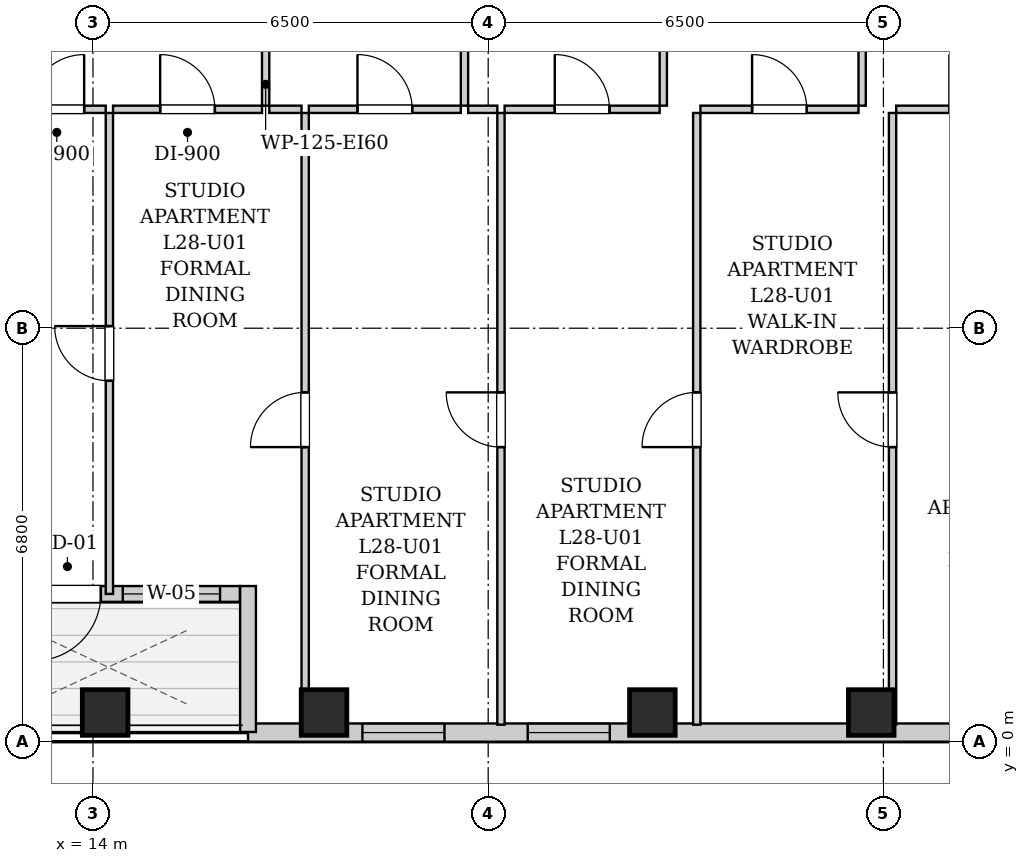
"""IFC4 building model, lengths in metres.
Left out: names, types, materials, properties, quantities, classifications, styles, units other than length and angle.
Written with IfcOpenShell. Run it as: python <this file> out.ifc"""

import sys

from ifc_helpers import new_model, si_unit, direction, frame, frame_2d, origin, origin_2d, place, context, subcontext, project, spatial, rectangle, extrude, element, fill, save


model = new_model("IFC4")
c1 = context("Model", 3, precision=1e-05, world=origin(), true_north=direction((0.0, 1.0)))
c2 = subcontext(c1, "Body", "Model", "MODEL_VIEW")
j1 = project(units=[si_unit("LENGTHUNIT", "METRE"), si_unit("PLANEANGLEUNIT", "RADIAN")], contexts=[c1])
p1 = place(None, origin())
s1 = spatial("IfcSite", under=j1, at=p1, CompositionType="ELEMENT")
p2 = place(p1, origin())
s2 = spatial("IfcBuilding", under=s1, at=p2, CompositionType="ELEMENT")
p3 = place(p2, frame((0.0, 0.0, 100.7)))
s3 = spatial("IfcBuildingStorey", under=s2, at=p3, CompositionType="ELEMENT", Elevation=100.7)
for number, where, z_axis, x_axis in (
    (1, (14.2, 0.48, 0.0), (0.0, 0.0, 1.0), (1.0, 0.0, 0.0)),
    (2, (17.8, 0.48, 0.0), (0.0, 0.0, 1.0), (1.0, 0.0, 0.0)),
    (3, (23.2, 0.48, 0.0), (0.0, 0.0, 1.0), (1.0, 0.0, 0.0)),
    (4, (26.8, 0.48, 0.0), (0.0, 0.0, 1.0), (1.0, 0.0, 0.0)),
):
    element("IfcColumn", number, at=place(p3, frame(where, z_axis=z_axis, x_axis=x_axis)), inside=s3, PredefinedType="COLUMN", context=c2, shape_type="SweptSolid", body=[
        extrude(rectangle(XDim=0.75, YDim=0.75, at=origin_2d()), origin(), (0.0, 0.0, 1.0), 3.2),
    ])
p4 = place(p3, frame((40.9, 0.15, 0.0), z_axis=(0.0, 0.0, 1.0), x_axis=(-1.0, 0.0, 0.0)))
e5 = element("IfcWall", 5, at=p4, inside=s3, PredefinedType="SOLIDWALL", context=c2, shape_type="SweptSolid", body=[
    extrude(rectangle(XDim=24.35, YDim=0.3, at=frame_2d((12.175, 0.0))), origin(), (0.0, 0.0, 1.0), 2.94),
])
p5 = place(p4, frame((21.119, 0.0, 0.55)))
e6 = element("IfcOpeningElement", 6, at=p5, cuts=e5, PredefinedType="OPENING", context=c2, shape_type="SweptSolid", body=[
    extrude(rectangle(XDim=1.35, YDim=1.2, at=frame_2d((0.675, 0.6))), frame((0.0, 0.16, 0.0), z_axis=(0.0, -1.0, 0.0), x_axis=(1.0, 0.0, 0.0)), (0.0, 0.0, 1.0), 0.32),
])
p6 = place(p4, frame((18.4, 0.0, 0.55)))
e7 = element("IfcOpeningElement", 7, at=p6, cuts=e5, PredefinedType="OPENING", context=c2, shape_type="SweptSolid", body=[
    extrude(rectangle(XDim=1.35, YDim=1.2, at=frame_2d((0.675, 0.6))), frame((0.0, 0.16, 0.0), z_axis=(0.0, -1.0, 0.0), x_axis=(1.0, 0.0, 0.0)), (0.0, 0.0, 1.0), 0.32),
])
p7 = place(p4, frame((11.424, 0.0, 0.55)))
e8 = element("IfcOpeningElement", 8, at=p7, cuts=e5, PredefinedType="OPENING", context=c2, shape_type="SweptSolid", body=[
    extrude(rectangle(XDim=1.35, YDim=1.2, at=frame_2d((0.675, 0.6))), frame((0.0, 0.16, 0.0), z_axis=(0.0, -1.0, 0.0), x_axis=(1.0, 0.0, 0.0)), (0.0, 0.0, 1.0), 0.32),
])
p8 = place(p4, frame((8.268, 0.0, 0.55)))
e9 = element("IfcOpeningElement", 9, at=p8, cuts=e5, PredefinedType="OPENING", context=c2, shape_type="SweptSolid", body=[
    extrude(rectangle(XDim=1.35, YDim=1.2, at=frame_2d((0.675, 0.6))), frame((0.0, 0.16, 0.0), z_axis=(0.0, -1.0, 0.0), x_axis=(1.0, 0.0, 0.0)), (0.0, 0.0, 1.0), 0.32),
])
p9 = place(p4, frame((5.037, 0.0, 0.55)))
e10 = element("IfcOpeningElement", 10, at=p9, cuts=e5, PredefinedType="OPENING", context=c2, shape_type="SweptSolid", body=[
    extrude(rectangle(XDim=1.35, YDim=1.2, at=frame_2d((0.675, 0.6))), frame((0.0, 0.16, 0.0), z_axis=(0.0, -1.0, 0.0), x_axis=(1.0, 0.0, 0.0)), (0.0, 0.0, 1.0), 0.32),
])
p10 = place(p3, frame((16.55, 0.16, 0.0), z_axis=(0.0, 0.0, 1.0), x_axis=(0.0, 1.0, 0.0)))
e11 = element("IfcWall", 11, at=p10, inside=s3, PredefinedType="SOLIDWALL", context=c2, shape_type="SweptSolid", body=[
    extrude(rectangle(XDim=2.4, YDim=0.26, at=frame_2d((1.2, 0.0))), origin(), (0.0, 0.0, 1.0), 2.94),
])
p11 = place(p3, frame((16.416, 2.43, 0.0), z_axis=(0.0, 0.0, 1.0), x_axis=(-1.0, 0.0, 0.0)))
e12 = element("IfcWall", 12, at=p11, inside=s3, PredefinedType="SOLIDWALL", context=c2, shape_type="SweptSolid", body=[
    extrude(rectangle(XDim=4.332, YDim=0.26, at=frame_2d((2.166, 0.0))), origin(), (0.0, 0.0, 1.0), 2.94),
])
p12 = place(p11, frame((2.286, 0.0, 0.0)))
e13 = element("IfcOpeningElement", 13, at=p12, cuts=e12, PredefinedType="OPENING", context=c2, shape_type="SweptSolid", body=[
    extrude(rectangle(XDim=1.1, YDim=2.0, at=frame_2d((0.55, 1.0))), frame((0.0, 0.14, 0.0), z_axis=(0.0, -1.0, 0.0), x_axis=(1.0, 0.0, 0.0)), (0.0, 0.0, 1.0), 0.28),
])
p13 = place(p11, frame((0.326, 0.0, 0.85)))
e14 = element("IfcOpeningElement", 14, at=p13, cuts=e12, PredefinedType="OPENING", context=c2, shape_type="SweptSolid", body=[
    extrude(rectangle(XDim=1.6, YDim=1.65, at=frame_2d((0.8, 0.825))), frame((0.0, 0.14, 0.0), z_axis=(0.0, -1.0, 0.0), x_axis=(1.0, 0.0, 0.0)), (0.0, 0.0, 1.0), 0.28),
])
p14 = place(p3, frame((16.84, 10.46, 0.0), z_axis=(0.0, 0.0, 1.0), x_axis=(0.0, 1.0, 0.0)))
e15 = element("IfcWall", 15, at=p14, inside=s3, PredefinedType="PARTITIONING", context=c2, shape_type="SweptSolid", body=[
    extrude(rectangle(XDim=2.85, YDim=0.12, at=frame_2d((1.425, 0.0))), origin(), (0.0, 0.0, 1.0), 2.94),
])
p15 = place(p14, frame((0.975, 0.0, 0.0)))
e16 = element("IfcOpeningElement", 16, at=p15, cuts=e15, PredefinedType="OPENING", context=c2, shape_type="SweptSolid", body=[
    extrude(rectangle(XDim=0.9, YDim=2.05, at=frame_2d((0.45, 1.025))), frame((0.0, 0.07, 0.0), z_axis=(0.0, -1.0, 0.0), x_axis=(1.0, 0.0, 0.0)), (0.0, 0.0, 1.0), 0.14),
])
p16 = place(p3, frame((12.6, 10.4, 0.0), z_axis=(0.0, 0.0, 1.0), x_axis=(1.0, 0.0, 0.0)))
e17 = element("IfcWall", 17, at=p16, inside=s3, PredefinedType="PARTITIONING", context=c2, shape_type="SweptSolid", body=[
    extrude(rectangle(XDim=1.61, YDim=0.12, at=frame_2d((0.805, 0.0))), origin(), (0.0, 0.0, 1.0), 2.94),
])
p17 = place(p16, frame((0.355, 0.0, 0.0)))
e18 = element("IfcOpeningElement", 18, at=p17, cuts=e17, PredefinedType="OPENING", context=c2, shape_type="SweptSolid", body=[
    extrude(rectangle(XDim=0.9, YDim=2.05, at=frame_2d((0.45, 1.025))), frame((0.0, 0.07, 0.0), z_axis=(0.0, -1.0, 0.0), x_axis=(1.0, 0.0, 0.0)), (0.0, 0.0, 1.0), 0.14),
])
p18 = place(p3, frame((14.33, 10.4, 0.0), z_axis=(0.0, 0.0, 1.0), x_axis=(1.0, 0.0, 0.0)))
e19 = element("IfcWall", 19, at=p18, inside=s3, PredefinedType="PARTITIONING", context=c2, shape_type="SweptSolid", body=[
    extrude(rectangle(XDim=2.45, YDim=0.12, at=frame_2d((1.225, 0.0))), origin(), (0.0, 0.0, 1.0), 2.94),
])
p19 = place(p18, frame((0.775, 0.0, 0.0)))
e20 = element("IfcOpeningElement", 20, at=p19, cuts=e19, PredefinedType="OPENING", context=c2, shape_type="SweptSolid", body=[
    extrude(rectangle(XDim=0.9, YDim=2.05, at=frame_2d((0.45, 1.025))), frame((0.0, 0.07, 0.0), z_axis=(0.0, -1.0, 0.0), x_axis=(1.0, 0.0, 0.0)), (0.0, 0.0, 1.0), 0.14),
])
p20 = place(p3, frame((20.11, 10.46, 0.0), z_axis=(0.0, 0.0, 1.0), x_axis=(0.0, 1.0, 0.0)))
e21 = element("IfcWall", 21, at=p20, inside=s3, PredefinedType="PARTITIONING", context=c2, shape_type="SweptSolid", body=[
    extrude(rectangle(XDim=2.85, YDim=0.12, at=frame_2d((1.425, 0.0))), origin(), (0.0, 0.0, 1.0), 2.94),
])
p21 = place(p20, frame((0.975, 0.0, 0.0)))
e22 = element("IfcOpeningElement", 22, at=p21, cuts=e21, PredefinedType="OPENING", context=c2, shape_type="SweptSolid", body=[
    extrude(rectangle(XDim=0.9, YDim=2.05, at=frame_2d((0.45, 1.025))), frame((0.0, 0.07, 0.0), z_axis=(0.0, -1.0, 0.0), x_axis=(1.0, 0.0, 0.0)), (0.0, 0.0, 1.0), 0.14),
])
p22 = place(p3, frame((16.9, 10.4, 0.0), z_axis=(0.0, 0.0, 1.0), x_axis=(1.0, 0.0, 0.0)))
e23 = element("IfcWall", 23, at=p22, inside=s3, PredefinedType="PARTITIONING", context=c2, shape_type="SweptSolid", body=[
    extrude(rectangle(XDim=0.53, YDim=0.12, at=frame_2d((0.265, 0.0))), origin(), (0.0, 0.0, 1.0), 2.94),
])
p23 = place(p3, frame((17.55, 10.4, 0.0), z_axis=(0.0, 0.0, 1.0), x_axis=(1.0, 0.0, 0.0)))
e24 = element("IfcWall", 24, at=p23, inside=s3, PredefinedType="PARTITIONING", context=c2, shape_type="SweptSolid", body=[
    extrude(rectangle(XDim=2.5, YDim=0.12, at=frame_2d((1.25, 0.0))), origin(), (0.0, 0.0, 1.0), 2.94),
])
p24 = place(p23, frame((0.8, 0.0, 0.0)))
e25 = element("IfcOpeningElement", 25, at=p24, cuts=e24, PredefinedType="OPENING", context=c2, shape_type="SweptSolid", body=[
    extrude(rectangle(XDim=0.9, YDim=2.05, at=frame_2d((0.45, 1.025))), frame((0.0, 0.07, 0.0), z_axis=(0.0, -1.0, 0.0), x_axis=(1.0, 0.0, 0.0)), (0.0, 0.0, 1.0), 0.14),
])
p25 = place(p3, frame((23.38, 10.46, 0.0), z_axis=(0.0, 0.0, 1.0), x_axis=(0.0, 1.0, 0.0)))
e26 = element("IfcWall", 26, at=p25, inside=s3, PredefinedType="PARTITIONING", context=c2, shape_type="SweptSolid", body=[
    extrude(rectangle(XDim=2.85, YDim=0.12, at=frame_2d((1.425, 0.0))), origin(), (0.0, 0.0, 1.0), 2.94),
])
p26 = place(p25, frame((0.975, 0.0, 0.0)))
e27 = element("IfcOpeningElement", 27, at=p26, cuts=e26, PredefinedType="OPENING", context=c2, shape_type="SweptSolid", body=[
    extrude(rectangle(XDim=0.9, YDim=2.05, at=frame_2d((0.45, 1.025))), frame((0.0, 0.07, 0.0), z_axis=(0.0, -1.0, 0.0), x_axis=(1.0, 0.0, 0.0)), (0.0, 0.0, 1.0), 0.14),
])
p27 = place(p3, frame((20.17, 10.4, 0.0), z_axis=(0.0, 0.0, 1.0), x_axis=(1.0, 0.0, 0.0)))
e28 = element("IfcWall", 28, at=p27, inside=s3, PredefinedType="PARTITIONING", context=c2, shape_type="SweptSolid", body=[
    extrude(rectangle(XDim=0.48, YDim=0.12, at=frame_2d((0.24, 0.0))), origin(), (0.0, 0.0, 1.0), 2.94),
])
p28 = place(p3, frame((20.77, 10.4, 0.0), z_axis=(0.0, 0.0, 1.0), x_axis=(1.0, 0.0, 0.0)))
e29 = element("IfcWall", 29, at=p28, inside=s3, PredefinedType="PARTITIONING", context=c2, shape_type="SweptSolid", body=[
    extrude(rectangle(XDim=2.55, YDim=0.12, at=frame_2d((1.275, 0.0))), origin(), (0.0, 0.0, 1.0), 2.94),
])
p29 = place(p28, frame((0.825, 0.0, 0.0)))
e30 = element("IfcOpeningElement", 30, at=p29, cuts=e29, PredefinedType="OPENING", context=c2, shape_type="SweptSolid", body=[
    extrude(rectangle(XDim=0.9, YDim=2.05, at=frame_2d((0.45, 1.025))), frame((0.0, 0.07, 0.0), z_axis=(0.0, -1.0, 0.0), x_axis=(1.0, 0.0, 0.0)), (0.0, 0.0, 1.0), 0.14),
])
p30 = place(p3, frame((26.65, 10.46, 0.0), z_axis=(0.0, 0.0, 1.0), x_axis=(0.0, 1.0, 0.0)))
e31 = element("IfcWall", 31, at=p30, inside=s3, PredefinedType="PARTITIONING", context=c2, shape_type="SweptSolid", body=[
    extrude(rectangle(XDim=2.85, YDim=0.12, at=frame_2d((1.425, 0.0))), origin(), (0.0, 0.0, 1.0), 2.94),
])
p31 = place(p30, frame((0.975, 0.0, 0.0)))
e32 = element("IfcOpeningElement", 32, at=p31, cuts=e31, PredefinedType="OPENING", context=c2, shape_type="SweptSolid", body=[
    extrude(rectangle(XDim=0.9, YDim=2.05, at=frame_2d((0.45, 1.025))), frame((0.0, 0.07, 0.0), z_axis=(0.0, -1.0, 0.0), x_axis=(1.0, 0.0, 0.0)), (0.0, 0.0, 1.0), 0.14),
])
p32 = place(p3, frame((23.99, 10.4, 0.0), z_axis=(0.0, 0.0, 1.0), x_axis=(1.0, 0.0, 0.0)))
e33 = element("IfcWall", 33, at=p32, inside=s3, PredefinedType="PARTITIONING", context=c2, shape_type="SweptSolid", body=[
    extrude(rectangle(XDim=2.6, YDim=0.12, at=frame_2d((1.3, 0.0))), origin(), (0.0, 0.0, 1.0), 2.94),
])
p33 = place(p32, frame((0.85, 0.0, 0.0)))
e34 = element("IfcOpeningElement", 34, at=p33, cuts=e33, PredefinedType="OPENING", context=c2, shape_type="SweptSolid", body=[
    extrude(rectangle(XDim=0.9, YDim=2.05, at=frame_2d((0.45, 1.025))), frame((0.0, 0.07, 0.0), z_axis=(0.0, -1.0, 0.0), x_axis=(1.0, 0.0, 0.0)), (0.0, 0.0, 1.0), 0.14),
])
p34 = place(p3, frame((27.21, 10.4, 0.0), z_axis=(0.0, 0.0, 1.0), x_axis=(1.0, 0.0, 0.0)))
e35 = element("IfcWall", 35, at=p34, inside=s3, PredefinedType="PARTITIONING", context=c2, shape_type="SweptSolid", body=[
    extrude(rectangle(XDim=2.65, YDim=0.12, at=frame_2d((1.325, 0.0))), origin(), (0.0, 0.0, 1.0), 2.94),
])
p35 = place(p34, frame((0.875, 0.0, 0.0)))
e36 = element("IfcOpeningElement", 36, at=p35, cuts=e35, PredefinedType="OPENING", context=c2, shape_type="SweptSolid", body=[
    extrude(rectangle(XDim=0.9, YDim=2.05, at=frame_2d((0.45, 1.025))), frame((0.0, 0.07, 0.0), z_axis=(0.0, -1.0, 0.0), x_axis=(1.0, 0.0, 0.0)), (0.0, 0.0, 1.0), 0.14),
])
p36 = place(p3, frame((14.27, 2.43, 0.0), z_axis=(0.0, 0.0, 1.0), x_axis=(0.0, 1.0, 0.0)))
e37 = element("IfcWall", 37, at=p36, inside=s3, PredefinedType="PARTITIONING", context=c2, shape_type="SweptSolid", body=[
    extrude(rectangle(XDim=7.91, YDim=0.12, at=frame_2d((3.955, 0.0))), origin(), (0.0, 0.0, 1.0), 2.94),
])
p37 = place(p36, frame((3.505, 0.0, 0.0)))
e38 = element("IfcOpeningElement", 38, at=p37, cuts=e37, PredefinedType="OPENING", context=c2, shape_type="SweptSolid", body=[
    extrude(rectangle(XDim=0.9, YDim=2.05, at=frame_2d((0.45, 1.025))), frame((0.0, 0.07, 0.0), z_axis=(0.0, -1.0, 0.0), x_axis=(1.0, 0.0, 0.0)), (0.0, 0.0, 1.0), 0.14),
])
p38 = place(p3, frame((17.49, 0.28, 0.0), z_axis=(0.0, 0.0, 1.0), x_axis=(0.0, 1.0, 0.0)))
e39 = element("IfcWall", 39, at=p38, inside=s3, PredefinedType="PARTITIONING", context=c2, shape_type="SweptSolid", body=[
    extrude(rectangle(XDim=10.06, YDim=0.12, at=frame_2d((5.03, 0.0))), origin(), (0.0, 0.0, 1.0), 2.94),
])
p39 = place(p38, frame((4.565, 0.0, 0.0)))
e40 = element("IfcOpeningElement", 40, at=p39, cuts=e39, PredefinedType="OPENING", context=c2, shape_type="SweptSolid", body=[
    extrude(rectangle(XDim=0.9, YDim=2.05, at=frame_2d((0.45, 1.025))), frame((0.0, 0.07, 0.0), z_axis=(0.0, -1.0, 0.0), x_axis=(1.0, 0.0, 0.0)), (0.0, 0.0, 1.0), 0.14),
])
p40 = place(p3, frame((20.71, 0.28, 0.0), z_axis=(0.0, 0.0, 1.0), x_axis=(0.0, 1.0, 0.0)))
e41 = element("IfcWall", 41, at=p40, inside=s3, PredefinedType="PARTITIONING", context=c2, shape_type="SweptSolid", body=[
    extrude(rectangle(XDim=10.06, YDim=0.12, at=frame_2d((5.03, 0.0))), origin(), (0.0, 0.0, 1.0), 2.94),
])
p41 = place(p40, frame((4.565, 0.0, 0.0)))
e42 = element("IfcOpeningElement", 42, at=p41, cuts=e41, PredefinedType="OPENING", context=c2, shape_type="SweptSolid", body=[
    extrude(rectangle(XDim=0.9, YDim=2.05, at=frame_2d((0.45, 1.025))), frame((0.0, 0.07, 0.0), z_axis=(0.0, -1.0, 0.0), x_axis=(1.0, 0.0, 0.0)), (0.0, 0.0, 1.0), 0.14),
])
p42 = place(p3, frame((23.93, 0.28, 0.0), z_axis=(0.0, 0.0, 1.0), x_axis=(0.0, 1.0, 0.0)))
e43 = element("IfcWall", 43, at=p42, inside=s3, PredefinedType="PARTITIONING", context=c2, shape_type="SweptSolid", body=[
    extrude(rectangle(XDim=10.06, YDim=0.12, at=frame_2d((5.03, 0.0))), origin(), (0.0, 0.0, 1.0), 2.94),
])
p43 = place(p42, frame((4.565, 0.0, 0.0)))
e44 = element("IfcOpeningElement", 44, at=p43, cuts=e43, PredefinedType="OPENING", context=c2, shape_type="SweptSolid", body=[
    extrude(rectangle(XDim=0.9, YDim=2.05, at=frame_2d((0.45, 1.025))), frame((0.0, 0.07, 0.0), z_axis=(0.0, -1.0, 0.0), x_axis=(1.0, 0.0, 0.0)), (0.0, 0.0, 1.0), 0.14),
])
p44 = place(p3, frame((27.15, 0.28, 0.0), z_axis=(0.0, 0.0, 1.0), x_axis=(0.0, 1.0, 0.0)))
e45 = element("IfcWall", 45, at=p44, inside=s3, PredefinedType="PARTITIONING", context=c2, shape_type="SweptSolid", body=[
    extrude(rectangle(XDim=10.06, YDim=0.12, at=frame_2d((5.03, 0.0))), origin(), (0.0, 0.0, 1.0), 2.94),
])
p45 = place(p44, frame((4.565, 0.0, 0.0)))
e46 = element("IfcOpeningElement", 46, at=p45, cuts=e45, PredefinedType="OPENING", context=c2, shape_type="SweptSolid", body=[
    extrude(rectangle(XDim=0.9, YDim=2.05, at=frame_2d((0.45, 1.025))), frame((0.0, 0.07, 0.0), z_axis=(0.0, -1.0, 0.0), x_axis=(1.0, 0.0, 0.0)), (0.0, 0.0, 1.0), 0.14),
])
p46 = place(p17, origin())
e47 = element("IfcDoor", 47, at=p46, inside=s3, OperationType="SINGLE_SWING_RIGHT", PredefinedType="DOOR", context=c2, shape_type="SweptSolid", body=[
    extrude(rectangle(XDim=0.9, YDim=2.05, at=frame_2d((0.45, 1.025))), frame((0.0, 0.025, 0.0), z_axis=(0.0, -1.0, 0.0), x_axis=(1.0, 0.0, 0.0)), (0.0, 0.0, 1.0), 0.05),
])
fill(e18, e47)
p47 = place(p19, origin())
e48 = element("IfcDoor", 48, at=p47, inside=s3, OperationType="SINGLE_SWING_LEFT", PredefinedType="DOOR", context=c2, shape_type="SweptSolid", body=[
    extrude(rectangle(XDim=0.9, YDim=2.05, at=frame_2d((0.45, 1.025))), frame((0.0, 0.025, 0.0), z_axis=(0.0, -1.0, 0.0), x_axis=(1.0, 0.0, 0.0)), (0.0, 0.0, 1.0), 0.05),
])
fill(e20, e48)
p48 = place(p24, origin())
e49 = element("IfcDoor", 49, at=p48, inside=s3, OperationType="SINGLE_SWING_LEFT", PredefinedType="DOOR", context=c2, shape_type="SweptSolid", body=[
    extrude(rectangle(XDim=0.9, YDim=2.05, at=frame_2d((0.45, 1.025))), frame((0.0, 0.025, 0.0), z_axis=(0.0, -1.0, 0.0), x_axis=(1.0, 0.0, 0.0)), (0.0, 0.0, 1.0), 0.05),
])
fill(e25, e49)
p49 = place(p29, origin())
e50 = element("IfcDoor", 50, at=p49, inside=s3, OperationType="SINGLE_SWING_LEFT", PredefinedType="DOOR", context=c2, shape_type="SweptSolid", body=[
    extrude(rectangle(XDim=0.9, YDim=2.05, at=frame_2d((0.45, 1.025))), frame((0.0, 0.025, 0.0), z_axis=(0.0, -1.0, 0.0), x_axis=(1.0, 0.0, 0.0)), (0.0, 0.0, 1.0), 0.05),
])
fill(e30, e50)
p50 = place(p33, origin())
e51 = element("IfcDoor", 51, at=p50, inside=s3, OperationType="SINGLE_SWING_LEFT", PredefinedType="DOOR", context=c2, shape_type="SweptSolid", body=[
    extrude(rectangle(XDim=0.9, YDim=2.05, at=frame_2d((0.45, 1.025))), frame((0.0, 0.025, 0.0), z_axis=(0.0, -1.0, 0.0), x_axis=(1.0, 0.0, 0.0)), (0.0, 0.0, 1.0), 0.05),
])
fill(e34, e51)
p51 = place(p35, origin())
e52 = element("IfcDoor", 52, at=p51, inside=s3, OperationType="SINGLE_SWING_LEFT", PredefinedType="DOOR", context=c2, shape_type="SweptSolid", body=[
    extrude(rectangle(XDim=0.9, YDim=2.05, at=frame_2d((0.45, 1.025))), frame((0.0, 0.025, 0.0), z_axis=(0.0, -1.0, 0.0), x_axis=(1.0, 0.0, 0.0)), (0.0, 0.0, 1.0), 0.05),
])
fill(e36, e52)
p52 = place(p37, origin())
e53 = element("IfcDoor", 53, at=p52, inside=s3, OperationType="SINGLE_SWING_RIGHT", PredefinedType="DOOR", context=c2, shape_type="SweptSolid", body=[
    extrude(rectangle(XDim=0.9, YDim=2.05, at=frame_2d((0.45, 1.025))), frame((0.0, 0.025, 0.0), z_axis=(0.0, -1.0, 0.0), x_axis=(1.0, 0.0, 0.0)), (0.0, 0.0, 1.0), 0.05),
])
fill(e38, e53)
p53 = place(p39, origin())
e54 = element("IfcDoor", 54, at=p53, inside=s3, OperationType="SINGLE_SWING_LEFT", PredefinedType="DOOR", context=c2, shape_type="SweptSolid", body=[
    extrude(rectangle(XDim=0.9, YDim=2.05, at=frame_2d((0.45, 1.025))), frame((0.0, 0.025, 0.0), z_axis=(0.0, -1.0, 0.0), x_axis=(1.0, 0.0, 0.0)), (0.0, 0.0, 1.0), 0.05),
])
fill(e40, e54)
p54 = place(p41, origin())
e55 = element("IfcDoor", 55, at=p54, inside=s3, OperationType="SINGLE_SWING_RIGHT", PredefinedType="DOOR", context=c2, shape_type="SweptSolid", body=[
    extrude(rectangle(XDim=0.9, YDim=2.05, at=frame_2d((0.45, 1.025))), frame((0.0, 0.025, 0.0), z_axis=(0.0, -1.0, 0.0), x_axis=(1.0, 0.0, 0.0)), (0.0, 0.0, 1.0), 0.05),
])
fill(e42, e55)
p55 = place(p43, origin())
e56 = element("IfcDoor", 56, at=p55, inside=s3, OperationType="SINGLE_SWING_LEFT", PredefinedType="DOOR", context=c2, shape_type="SweptSolid", body=[
    extrude(rectangle(XDim=0.9, YDim=2.05, at=frame_2d((0.45, 1.025))), frame((0.0, 0.025, 0.0), z_axis=(0.0, -1.0, 0.0), x_axis=(1.0, 0.0, 0.0)), (0.0, 0.0, 1.0), 0.05),
])
fill(e44, e56)
p56 = place(p45, origin())
e57 = element("IfcDoor", 57, at=p56, inside=s3, OperationType="SINGLE_SWING_RIGHT", PredefinedType="DOOR", context=c2, shape_type="SweptSolid", body=[
    extrude(rectangle(XDim=0.9, YDim=2.05, at=frame_2d((0.45, 1.025))), frame((0.0, 0.025, 0.0), z_axis=(0.0, -1.0, 0.0), x_axis=(1.0, 0.0, 0.0)), (0.0, 0.0, 1.0), 0.05),
])
fill(e46, e57)
p57 = place(p12, origin())
e58 = element("IfcDoor", 58, at=p57, inside=s3, OperationType="SINGLE_SWING_RIGHT", PredefinedType="DOOR", context=c2, shape_type="SweptSolid", body=[
    extrude(rectangle(XDim=1.1, YDim=2.0, at=frame_2d((0.55, 1.0))), frame((0.0, 0.025, 0.0), z_axis=(0.0, -1.0, 0.0), x_axis=(1.0, 0.0, 0.0)), (0.0, 0.0, 1.0), 0.05),
])
fill(e13, e58)
p58 = place(p13, origin())
e59 = element("IfcWindow", 59, at=p58, inside=s3, PartitioningType="DOUBLE_PANEL_VERTICAL", PredefinedType="WINDOW", context=c2, shape_type="SweptSolid", body=[
    extrude(rectangle(XDim=1.6, YDim=1.65, at=frame_2d((0.8, 0.825))), frame((0.0, 0.03, 0.0), z_axis=(0.0, -1.0, 0.0), x_axis=(1.0, 0.0, 0.0)), (0.0, 0.0, 1.0), 0.06),
])
fill(e14, e59)
p59 = place(p5, origin())
e60 = element("IfcWindow", 60, at=p59, inside=s3, PartitioningType="SINGLE_PANEL", PredefinedType="WINDOW", context=c2, shape_type="SweptSolid", body=[
    extrude(rectangle(XDim=1.35, YDim=1.2, at=frame_2d((0.675, 0.6))), frame((0.0, 0.03, 0.0), z_axis=(0.0, -1.0, 0.0), x_axis=(1.0, 0.0, 0.0)), (0.0, 0.0, 1.0), 0.06),
])
fill(e6, e60)
p60 = place(p6, origin())
e61 = element("IfcWindow", 61, at=p60, inside=s3, PartitioningType="SINGLE_PANEL", PredefinedType="WINDOW", context=c2, shape_type="SweptSolid", body=[
    extrude(rectangle(XDim=1.35, YDim=1.2, at=frame_2d((0.675, 0.6))), frame((0.0, 0.03, 0.0), z_axis=(0.0, -1.0, 0.0), x_axis=(1.0, 0.0, 0.0)), (0.0, 0.0, 1.0), 0.06),
])
fill(e7, e61)
save(model, sys.argv[1])
